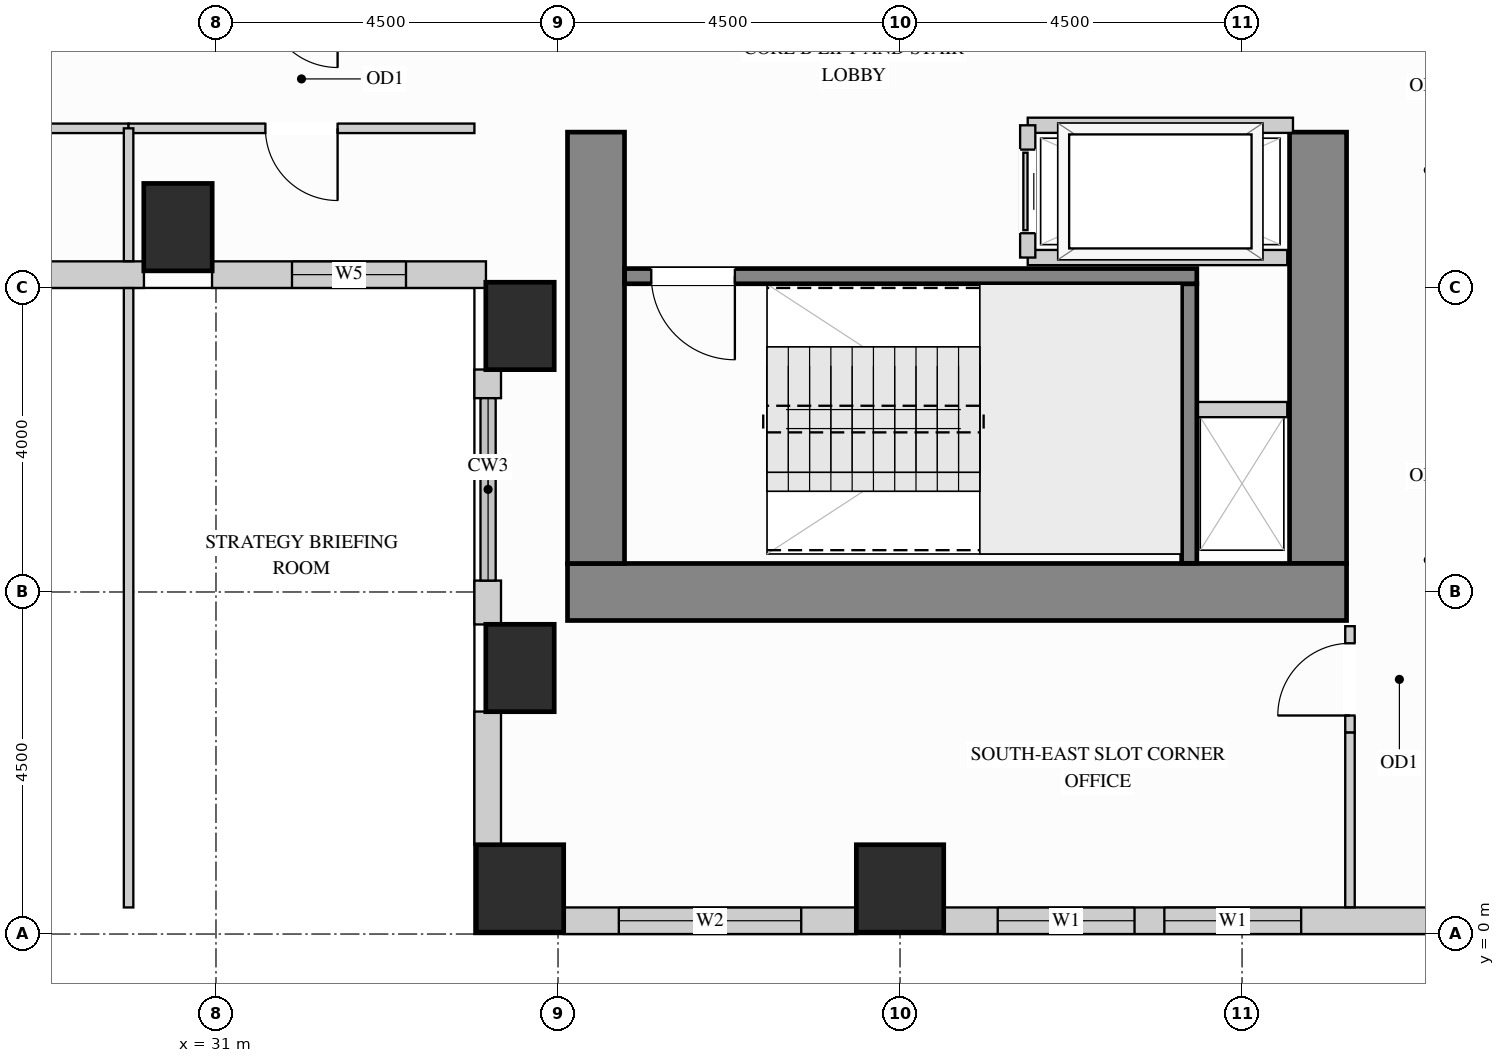
"""IFC4 building model, lengths in metres.
Left out: names, types, materials, properties, quantities, classifications, styles, units other than length and angle.
Written with IfcOpenShell. Run it as: python <this file> out.ifc"""

import sys

from ifc_helpers import new_model, si_unit, direction, frame, frame_2d, origin, origin_2d, place, context, subcontext, project, spatial, rectangle, extrude, source, transform, mapped, element, fill, save


model = new_model("IFC4")
c1 = context("Model", 3, precision=1e-05, world=origin(), true_north=direction((0.0, 1.0)))
c2 = subcontext(c1, "Body", "Model", "MODEL_VIEW")
j1 = project(units=[si_unit("LENGTHUNIT", "METRE"), si_unit("PLANEANGLEUNIT", "RADIAN")], contexts=[c1])
p1 = place(None, origin())
s1 = spatial("IfcSite", under=j1, at=p1, CompositionType="ELEMENT")
p2 = place(p1, origin())
s2 = spatial("IfcBuilding", under=s1, at=p2, CompositionType="ELEMENT")
p3 = place(p2, frame((0.0, 0.0, 88.2)))
s3 = spatial("IfcBuildingStorey", under=s2, at=p3, CompositionType="ELEMENT", Elevation=88.2)
m1 = source(origin(), c2, "Body", "SweptSolid", [
    extrude(rectangle(XDim=0.9, YDim=1.15, at=origin_2d()), origin(), (0.0, 0.0, 1.0), 3.38),
])
for number, where, z_axis, x_axis in (
    (1, (35.0, 3.5, 0.0), (0.0, 0.0, 1.0), (1.0, 0.0, 0.0)),
    (2, (35.0, 8.0, 0.0), (0.0, 0.0, 1.0), (1.0, 0.0, 0.0)),
    (3, (30.5, 9.3, 0.0), (0.0, 0.0, 1.0), (1.0, 0.0, 0.0)),
):
    element("IfcColumn", number, at=place(p3, frame(where, z_axis=z_axis, x_axis=x_axis)), inside=s3, PredefinedType="COLUMN", context=c2, shape_type="MappedRepresentation", body=[
        mapped(m1, transform((0.0, 0.0, 0.0), x_axis=(1.0, 0.0, 0.0), y_axis=(0.0, 1.0, 0.0), z_axis=(0.0, 0.0, 1.0))),
    ])
m2 = source(origin(), c2, "Body", "SweptSolid", [
    extrude(rectangle(XDim=1.15, YDim=1.15, at=origin_2d()), origin(), (0.0, 0.0, 1.0), 3.38),
])
for number, where, z_axis, x_axis in (
    (4, (35.0, 0.6, 0.0), (0.0, 0.0, 1.0), (1.0, 0.0, 0.0)),
    (5, (40.0, 0.6, 0.0), (0.0, 0.0, 1.0), (1.0, 0.0, 0.0)),
):
    element("IfcColumn", number, at=place(p3, frame(where, z_axis=z_axis, x_axis=x_axis)), inside=s3, PredefinedType="COLUMN", context=c2, shape_type="MappedRepresentation", body=[
        mapped(m2, transform((0.0, 0.0, 0.0), x_axis=(1.0, 0.0, 0.0), y_axis=(0.0, 1.0, 0.0), z_axis=(0.0, 0.0, 1.0))),
    ])
m3 = source(origin(), c2, "Body", "SweptSolid", [
    extrude(rectangle(XDim=5.675, YDim=0.75, at=frame_2d((2.837, 0.0))), origin(), (0.0, 0.0, 1.0), 3.38),
])
p4 = place(p3, frame((45.5, 4.875, 0.0), z_axis=(0.0, 0.0, 1.0), x_axis=(0.0, 1.0, 0.0)))
e6 = element("IfcWall", 6, at=p4, inside=s3, PredefinedType="SHEAR", context=c2, shape_type="MappedRepresentation", body=[
    mapped(m3, transform((0.0, 0.0, 0.0), x_axis=(1.0, 0.0, 0.0), y_axis=(0.0, 1.0, 0.0), z_axis=(0.0, 0.0, 1.0))),
])
m4 = source(origin(), c2, "Body", "SweptSolid", [
    extrude(rectangle(XDim=10.25, YDim=0.75, at=frame_2d((5.125, 0.0))), origin(), (0.0, 0.0, 1.0), 3.38),
])
p5 = place(p3, frame((35.625, 4.5, 0.0), z_axis=(0.0, 0.0, 1.0), x_axis=(1.0, 0.0, 0.0)))
e7 = element("IfcWall", 7, at=p5, inside=s3, PredefinedType="SHEAR", context=c2, shape_type="MappedRepresentation", body=[
    mapped(m4, transform((0.0, 0.0, 0.0), x_axis=(1.0, 0.0, 0.0), y_axis=(0.0, 1.0, 0.0), z_axis=(0.0, 0.0, 1.0))),
])
p6 = place(p3, frame((36.0, 4.875, 0.0), z_axis=(0.0, 0.0, 1.0), x_axis=(0.0, 1.0, 0.0)))
e8 = element("IfcWall", 8, at=p6, inside=s3, PredefinedType="SHEAR", context=c2, shape_type="MappedRepresentation", body=[
    mapped(m3, transform((0.0, 0.0, 0.0), x_axis=(1.0, 0.0, 0.0), y_axis=(0.0, 1.0, 0.0), z_axis=(0.0, 0.0, 1.0))),
])
p7 = place(p3, frame((23.848, 8.675, 0.0), z_axis=(0.0, 0.0, 1.0), x_axis=(1.0, 0.0, 0.0)))
e9 = element("IfcWall", 9, at=p7, inside=s3, PredefinedType="SOLIDWALL", context=c2, shape_type="SweptSolid", body=[
    extrude(rectangle(XDim=6.204, YDim=0.35, at=frame_2d((3.102, 0.0))), origin(), (0.0, 0.0, 1.0), 3.365),
])
p8 = place(p7, frame((1.131, 0.0, 0.78)))
e10 = element("IfcOpeningElement", 10, at=p8, cuts=e9, PredefinedType="OPENING", context=c2, shape_type="SweptSolid", body=[
    extrude(rectangle(XDim=1.5, YDim=2.0, at=frame_2d((0.75, 1.0))), frame((0.0, 0.185, 0.0), z_axis=(0.0, -1.0, 0.0), x_axis=(1.0, 0.0, 0.0)), (0.0, 0.0, 1.0), 0.37),
])
p9 = place(p7, frame((3.441, 0.0, 0.78)))
e11 = element("IfcOpeningElement", 11, at=p9, cuts=e9, PredefinedType="OPENING", context=c2, shape_type="SweptSolid", body=[
    extrude(rectangle(XDim=1.5, YDim=2.0, at=frame_2d((0.75, 1.0))), frame((0.0, 0.185, 0.0), z_axis=(0.0, -1.0, 0.0), x_axis=(1.0, 0.0, 0.0)), (0.0, 0.0, 1.0), 0.37),
])
p10 = place(p3, frame((30.948, 8.675, 0.0), z_axis=(0.0, 0.0, 1.0), x_axis=(1.0, 0.0, 0.0)))
e12 = element("IfcWall", 12, at=p10, inside=s3, PredefinedType="SOLIDWALL", context=c2, shape_type="SweptSolid", body=[
    extrude(rectangle(XDim=3.604, YDim=0.35, at=frame_2d((1.802, 0.0))), origin(), (0.0, 0.0, 1.0), 3.365),
])
p11 = place(p10, frame((1.052, 0.0, 0.78)))
e13 = element("IfcOpeningElement", 13, at=p11, cuts=e12, PredefinedType="OPENING", context=c2, shape_type="SweptSolid", body=[
    extrude(rectangle(XDim=1.5, YDim=2.0, at=frame_2d((0.75, 1.0))), frame((0.0, 0.185, 0.0), z_axis=(0.0, -1.0, 0.0), x_axis=(1.0, 0.0, 0.0)), (0.0, 0.0, 1.0), 0.37),
])
m5 = source(origin(), c2, "Body", "SweptSolid", [
    extrude(rectangle(XDim=0.377, YDim=0.35, at=frame_2d((0.188, 0.0))), origin(), (0.0, 0.0, 1.0), 3.365),
])
p12 = place(p3, frame((34.575, 7.427, 0.0), z_axis=(0.0, 0.0, 1.0), x_axis=(0.0, -1.0, 0.0)))
e14 = element("IfcWall", 14, at=p12, inside=s3, PredefinedType="SOLIDWALL", context=c2, shape_type="MappedRepresentation", body=[
    mapped(m5, transform((0.0, 0.0, 0.0), x_axis=(1.0, 0.0, 0.0), y_axis=(0.0, 1.0, 0.0), z_axis=(0.0, 0.0, 1.0))),
])
m6 = source(origin(), c2, "Body", "SweptSolid", [
    extrude(rectangle(XDim=0.577, YDim=0.35, at=frame_2d((0.289, 0.0))), origin(), (0.0, 0.0, 1.0), 3.365),
])
p13 = place(p3, frame((34.575, 4.65, 0.0), z_axis=(0.0, 0.0, 1.0), x_axis=(0.0, -1.0, 0.0)))
e15 = element("IfcWall", 15, at=p13, inside=s3, PredefinedType="SOLIDWALL", context=c2, shape_type="MappedRepresentation", body=[
    mapped(m6, transform((0.0, 0.0, 0.0), x_axis=(1.0, 0.0, 0.0), y_axis=(0.0, 1.0, 0.0), z_axis=(0.0, 0.0, 1.0))),
])
m7 = source(origin(), c2, "Body", "SweptSolid", [
    extrude(rectangle(XDim=1.754, YDim=0.35, at=frame_2d((0.877, 0.0))), origin(), (0.0, 0.0, 1.0), 3.365),
])
p14 = place(p3, frame((34.575, 2.927, 0.0), z_axis=(0.0, 0.0, 1.0), x_axis=(0.0, -1.0, 0.0)))
e16 = element("IfcWall", 16, at=p14, inside=s3, PredefinedType="SOLIDWALL", context=c2, shape_type="MappedRepresentation", body=[
    mapped(m7, transform((0.0, 0.0, 0.0), x_axis=(1.0, 0.0, 0.0), y_axis=(0.0, 1.0, 0.0), z_axis=(0.0, 0.0, 1.0))),
])
p15 = place(p3, frame((35.573, 0.175, 0.0), z_axis=(0.0, 0.0, 1.0), x_axis=(1.0, 0.0, 0.0)))
e17 = element("IfcWall", 17, at=p15, inside=s3, PredefinedType="SOLIDWALL", context=c2, shape_type="SweptSolid", body=[
    extrude(rectangle(XDim=3.854, YDim=0.35, at=frame_2d((1.927, 0.0))), origin(), (0.0, 0.0, 1.0), 2.428),
])
p16 = place(p15, frame((0.727, 0.0, 0.78)))
e18 = element("IfcOpeningElement", 18, at=p16, cuts=e17, PredefinedType="OPENING", context=c2, shape_type="SweptSolid", body=[
    extrude(rectangle(XDim=2.4, YDim=1.468, at=frame_2d((1.2, 0.734))), frame((0.0, 0.185, 0.0), z_axis=(0.0, -1.0, 0.0), x_axis=(1.0, 0.0, 0.0)), (0.0, 0.0, 1.0), 0.37),
])
p17 = place(p3, frame((40.573, 0.175, 0.0), z_axis=(0.0, 0.0, 1.0), x_axis=(1.0, 0.0, 0.0)))
e19 = element("IfcWall", 19, at=p17, inside=s3, PredefinedType="SOLIDWALL", context=c2, shape_type="SweptSolid", body=[
    extrude(rectangle(XDim=6.454, YDim=0.35, at=frame_2d((3.227, 0.0))), origin(), (0.0, 0.0, 1.0), 2.428),
])
p18 = place(p17, frame((0.712, 0.0, 0.78)))
e20 = element("IfcOpeningElement", 20, at=p18, cuts=e19, PredefinedType="OPENING", context=c2, shape_type="SweptSolid", body=[
    extrude(rectangle(XDim=1.8, YDim=1.468, at=frame_2d((0.9, 0.734))), frame((0.0, 0.185, 0.0), z_axis=(0.0, -1.0, 0.0), x_axis=(1.0, 0.0, 0.0)), (0.0, 0.0, 1.0), 0.37),
])
p19 = place(p17, frame((2.905, 0.0, 0.78)))
e21 = element("IfcOpeningElement", 21, at=p19, cuts=e19, PredefinedType="OPENING", context=c2, shape_type="SweptSolid", body=[
    extrude(rectangle(XDim=1.8, YDim=1.468, at=frame_2d((0.9, 0.734))), frame((0.0, 0.185, 0.0), z_axis=(0.0, -1.0, 0.0), x_axis=(1.0, 0.0, 0.0)), (0.0, 0.0, 1.0), 0.37),
])
p20 = place(p3, frame((45.92, 2.65, 0.0), z_axis=(0.0, 0.0, 1.0), x_axis=(0.0, 1.0, 0.0)))
e22 = element("IfcWall", 22, at=p20, inside=s3, PredefinedType="PARTITIONING", context=c2, shape_type="SweptSolid", body=[
    extrude(rectangle(XDim=1.4, YDim=0.125, at=frame_2d((0.7, 0.0))), origin(), (0.0, 0.0, 1.0), 3.365),
])
p21 = place(p20, frame((0.225, 0.0, 0.0)))
e23 = element("IfcOpeningElement", 23, at=p21, cuts=e22, PredefinedType="OPENING", context=c2, shape_type="SweptSolid", body=[
    extrude(rectangle(XDim=0.95, YDim=2.15, at=frame_2d((0.475, 1.075))), frame((0.0, 0.073, 0.0), z_axis=(0.0, -1.0, 0.0), x_axis=(1.0, 0.0, 0.0)), (0.0, 0.0, 1.0), 0.145),
])
m8 = source(origin(), c2, "Body", "SweptSolid", [
    extrude(rectangle(XDim=2.298, YDim=0.125, at=frame_2d((1.149, 0.0))), origin(), (0.0, 0.0, 1.0), 3.365),
])
p22 = place(p3, frame((45.92, 0.352, 0.0), z_axis=(0.0, 0.0, 1.0), x_axis=(0.0, 1.0, 0.0)))
e24 = element("IfcWall", 24, at=p22, inside=s3, PredefinedType="PARTITIONING", context=c2, shape_type="MappedRepresentation", body=[
    mapped(m8, transform((0.0, 0.0, 0.0), x_axis=(1.0, 0.0, 0.0), y_axis=(0.0, 1.0, 0.0), z_axis=(0.0, 0.0, 1.0))),
])
p23 = place(p3, frame((23.85, 10.6, 0.0), z_axis=(0.0, 0.0, 1.0), x_axis=(1.0, 0.0, 0.0)))
e25 = element("IfcWall", 25, at=p23, inside=s3, PredefinedType="PARTITIONING", context=c2, shape_type="SweptSolid", body=[
    extrude(rectangle(XDim=6.0, YDim=0.125, at=frame_2d((3.0, 0.0))), origin(), (0.0, 0.0, 1.0), 3.365),
])
p24 = place(p23, frame((2.525, 0.0, 0.0)))
e26 = element("IfcOpeningElement", 26, at=p24, cuts=e25, PredefinedType="OPENING", context=c2, shape_type="SweptSolid", body=[
    extrude(rectangle(XDim=0.95, YDim=2.15, at=frame_2d((0.475, 1.075))), frame((0.0, 0.073, 0.0), z_axis=(0.0, -1.0, 0.0), x_axis=(1.0, 0.0, 0.0)), (0.0, 0.0, 1.0), 0.145),
])
p25 = place(p3, frame((29.85, 10.6, 0.0), z_axis=(0.0, 0.0, 1.0), x_axis=(1.0, 0.0, 0.0)))
e27 = element("IfcWall", 27, at=p25, inside=s3, PredefinedType="PARTITIONING", context=c2, shape_type="SweptSolid", body=[
    extrude(rectangle(XDim=4.55, YDim=0.125, at=frame_2d((2.275, 0.0))), origin(), (0.0, 0.0, 1.0), 3.365),
])
p26 = place(p25, frame((1.8, 0.0, 0.0)))
e28 = element("IfcOpeningElement", 28, at=p26, cuts=e27, PredefinedType="OPENING", context=c2, shape_type="SweptSolid", body=[
    extrude(rectangle(XDim=0.95, YDim=2.15, at=frame_2d((0.475, 1.075))), frame((0.0, 0.073, 0.0), z_axis=(0.0, -1.0, 0.0), x_axis=(1.0, 0.0, 0.0)), (0.0, 0.0, 1.0), 0.145),
])
m9 = source(origin(), c2, "Body", "SweptSolid", [
    extrude(rectangle(XDim=8.148, YDim=0.125, at=frame_2d((4.074, 0.0))), origin(), (0.0, 0.0, 1.0), 3.365),
])
p27 = place(p3, frame((29.85, 0.35, 0.0), z_axis=(0.0, 0.0, 1.0), x_axis=(0.0, 1.0, 0.0)))
e29 = element("IfcWall", 29, at=p27, inside=s3, PredefinedType="PARTITIONING", context=c2, shape_type="MappedRepresentation", body=[
    mapped(m9, transform((0.0, 0.0, 0.0), x_axis=(1.0, 0.0, 0.0), y_axis=(0.0, 1.0, 0.0), z_axis=(0.0, 0.0, 1.0))),
])
m10 = source(origin(), c2, "Body", "SweptSolid", [
    extrude(rectangle(XDim=1.748, YDim=0.125, at=frame_2d((0.874, 0.0))), origin(), (0.0, 0.0, 1.0), 3.365),
])
p28 = place(p3, frame((29.85, 8.852, 0.0), z_axis=(0.0, 0.0, 1.0), x_axis=(0.0, 1.0, 0.0)))
e30 = element("IfcWall", 30, at=p28, inside=s3, PredefinedType="PARTITIONING", context=c2, shape_type="MappedRepresentation", body=[
    mapped(m10, transform((0.0, 0.0, 0.0), x_axis=(1.0, 0.0, 0.0), y_axis=(0.0, 1.0, 0.0), z_axis=(0.0, 0.0, 1.0))),
])
m11 = source(origin(), c2, "Body", "SweptSolid", [
    extrude(rectangle(XDim=1.245, YDim=0.2, at=frame_2d((0.623, 0.0))), origin(), (0.0, 0.0, 1.0), 3.365),
])
p29 = place(p3, frame((43.85, 6.9, 0.0), z_axis=(0.0, 0.0, 1.0), x_axis=(1.0, 0.0, 0.0)))
e31 = element("IfcWall", 31, at=p29, inside=s3, PredefinedType="PARTITIONING", context=c2, shape_type="MappedRepresentation", body=[
    mapped(m11, transform((0.0, 0.0, 0.0), x_axis=(1.0, 0.0, 0.0), y_axis=(0.0, 1.0, 0.0), z_axis=(0.0, 0.0, 1.0))),
])
m12 = source(origin(), c2, "Body", "SweptSolid", [
    extrude(rectangle(XDim=3.49, YDim=0.2, at=frame_2d((1.745, 0.0))), origin(), (0.0, 0.0, 1.0), 3.365),
])
p30 = place(p3, frame((41.68, 10.64, 0.0), z_axis=(0.0, 0.0, 1.0), x_axis=(1.0, 0.0, 0.0)))
e32 = element("IfcWall", 32, at=p30, inside=s3, PredefinedType="PARTITIONING", context=c2, shape_type="MappedRepresentation", body=[
    mapped(m12, transform((0.0, 0.0, 0.0), x_axis=(1.0, 0.0, 0.0), y_axis=(0.0, 1.0, 0.0), z_axis=(0.0, 0.0, 1.0))),
])
m13 = source(origin(), c2, "Body", "SweptSolid", [
    extrude(rectangle(XDim=3.415, YDim=0.2, at=frame_2d((1.708, 0.0))), origin(), (0.0, 0.0, 1.0), 3.365),
])
p31 = place(p3, frame((41.68, 8.9, 0.0), z_axis=(0.0, 0.0, 1.0), x_axis=(1.0, 0.0, 0.0)))
e33 = element("IfcWall", 33, at=p31, inside=s3, PredefinedType="PARTITIONING", context=c2, shape_type="MappedRepresentation", body=[
    mapped(m13, transform((0.0, 0.0, 0.0), x_axis=(1.0, 0.0, 0.0), y_axis=(0.0, 1.0, 0.0), z_axis=(0.0, 0.0, 1.0))),
])
p32 = place(p3, frame((41.68, 8.9, 0.0), z_axis=(0.0, 0.0, 1.0), x_axis=(0.0, 1.0, 0.0)))
e34 = element("IfcWall", 34, at=p32, inside=s3, PredefinedType="PARTITIONING", context=c2, shape_type="SweptSolid", body=[
    extrude(rectangle(XDim=1.74, YDim=0.2, at=frame_2d((0.87, 0.0))), origin(), (0.0, 0.0, 1.0), 3.365),
])
p33 = place(p32, frame((0.32, 0.0, 0.0)))
e35 = element("IfcOpeningElement", 35, at=p33, cuts=e34, PredefinedType="OPENING", context=c2, shape_type="SweptSolid", body=[
    extrude(rectangle(XDim=1.1, YDim=2.2, at=frame_2d((0.55, 1.1))), frame((0.0, 0.11, 0.0), z_axis=(0.0, -1.0, 0.0), x_axis=(1.0, 0.0, 0.0)), (0.0, 0.0, 1.0), 0.22),
])
m14 = source(origin(), c2, "Body", "SweptSolid", [
    extrude(rectangle(XDim=3.678, YDim=0.2, at=frame_2d((1.839, 0.0))), origin(), (0.0, 0.0, 1.0), 3.38),
])
p34 = place(p3, frame((43.805, 4.877, 0.0), z_axis=(0.0, 0.0, 1.0), x_axis=(0.0, 1.0, 0.0)))
e36 = element("IfcWall", 36, at=p34, inside=s3, PredefinedType="SHEAR", context=c2, shape_type="MappedRepresentation", body=[
    mapped(m14, transform((0.0, 0.0, 0.0), x_axis=(1.0, 0.0, 0.0), y_axis=(0.0, 1.0, 0.0), z_axis=(0.0, 0.0, 1.0))),
])
p35 = place(p3, frame((36.377, 8.655, 0.0), z_axis=(0.0, 0.0, 1.0), x_axis=(1.0, 0.0, 0.0)))
e37 = element("IfcWall", 37, at=p35, inside=s3, PredefinedType="SHEAR", context=c2, shape_type="SweptSolid", body=[
    extrude(rectangle(XDim=7.528, YDim=0.2, at=frame_2d((3.764, 0.0))), origin(), (0.0, 0.0, 1.0), 3.38),
])
p36 = place(p35, frame((0.35, 0.0, 0.0)))
e38 = element("IfcOpeningElement", 38, at=p36, cuts=e37, PredefinedType="OPENING", context=c2, shape_type="SweptSolid", body=[
    extrude(rectangle(XDim=1.1, YDim=2.15, at=frame_2d((0.55, 1.075))), frame((0.0, 0.11, 0.0), z_axis=(0.0, -1.0, 0.0), x_axis=(1.0, 0.0, 0.0)), (0.0, 0.0, 1.0), 0.22),
])
m15 = source(origin(), c2, "Body", "SweptSolid", [
    extrude(rectangle(XDim=1.1, YDim=2.2, at=frame_2d((0.55, 1.1))), frame((0.0, 0.025, 0.0), z_axis=(0.0, -1.0, 0.0), x_axis=(1.0, 0.0, 0.0)), (0.0, 0.0, 1.0), 0.05),
])
p37 = place(p33, origin())
e39 = element("IfcDoor", 39, at=p37, inside=s3, OperationType="SLIDING_TO_LEFT", PredefinedType="DOOR", context=c2, shape_type="MappedRepresentation", body=[
    mapped(m15, transform((0.0, 0.0, 0.0), x_axis=(1.0, 0.0, 0.0), y_axis=(0.0, 1.0, 0.0), z_axis=(0.0, 0.0, 1.0))),
])
fill(e35, e39)
m16 = source(origin(), c2, "Body", "SweptSolid", [
    extrude(rectangle(XDim=0.95, YDim=2.15, at=frame_2d((0.475, 1.075))), frame((0.0, 0.025, 0.0), z_axis=(0.0, -1.0, 0.0), x_axis=(1.0, 0.0, 0.0)), (0.0, 0.0, 1.0), 0.05),
])
p38 = place(p21, origin())
e40 = element("IfcDoor", 40, at=p38, inside=s3, OperationType="SINGLE_SWING_LEFT", PredefinedType="DOOR", context=c2, shape_type="MappedRepresentation", body=[
    mapped(m16, transform((0.0, 0.0, 0.0), x_axis=(1.0, 0.0, 0.0), y_axis=(0.0, 1.0, 0.0), z_axis=(0.0, 0.0, 1.0))),
])
fill(e23, e40)
p39 = place(p26, origin())
e41 = element("IfcDoor", 41, at=p39, inside=s3, OperationType="SINGLE_SWING_RIGHT", PredefinedType="DOOR", context=c2, shape_type="MappedRepresentation", body=[
    mapped(m16, transform((0.0, 0.0, 0.0), x_axis=(1.0, 0.0, 0.0), y_axis=(0.0, 1.0, 0.0), z_axis=(0.0, 0.0, 1.0))),
])
fill(e28, e41)
m17 = source(origin(), c2, "Body", "SweptSolid", [
    extrude(rectangle(XDim=1.1, YDim=2.15, at=frame_2d((0.55, 1.075))), frame((0.0, 0.025, 0.0), z_axis=(0.0, -1.0, 0.0), x_axis=(1.0, 0.0, 0.0)), (0.0, 0.0, 1.0), 0.05),
])
p40 = place(p36, origin())
e42 = element("IfcDoor", 42, at=p40, inside=s3, OperationType="SINGLE_SWING_RIGHT", PredefinedType="DOOR", context=c2, shape_type="MappedRepresentation", body=[
    mapped(m17, transform((0.0, 0.0, 0.0), x_axis=(1.0, 0.0, 0.0), y_axis=(0.0, 1.0, 0.0), z_axis=(0.0, 0.0, 1.0))),
])
fill(e38, e42)
m18 = source(origin(), c2, "Body", "SweptSolid", [
    extrude(rectangle(XDim=1.8, YDim=1.468, at=frame_2d((0.9, 0.734))), frame((0.0, 0.03, 0.0), z_axis=(0.0, -1.0, 0.0), x_axis=(1.0, 0.0, 0.0)), (0.0, 0.0, 1.0), 0.06),
])
p41 = place(p18, origin())
e43 = element("IfcWindow", 43, at=p41, inside=s3, PartitioningType="SINGLE_PANEL", PredefinedType="WINDOW", context=c2, shape_type="MappedRepresentation", body=[
    mapped(m18, transform((0.0, 0.0, 0.0), x_axis=(1.0, 0.0, 0.0), y_axis=(0.0, 1.0, 0.0), z_axis=(0.0, 0.0, 1.0))),
])
fill(e20, e43)
p42 = place(p19, origin())
e44 = element("IfcWindow", 44, at=p42, inside=s3, PartitioningType="SINGLE_PANEL", PredefinedType="WINDOW", context=c2, shape_type="MappedRepresentation", body=[
    mapped(m18, transform((0.0, 0.0, 0.0), x_axis=(1.0, 0.0, 0.0), y_axis=(0.0, 1.0, 0.0), z_axis=(0.0, 0.0, 1.0))),
])
fill(e21, e44)
m19 = source(origin(), c2, "Body", "SweptSolid", [
    extrude(rectangle(XDim=2.4, YDim=1.468, at=frame_2d((1.2, 0.734))), frame((0.0, 0.03, 0.0), z_axis=(0.0, -1.0, 0.0), x_axis=(1.0, 0.0, 0.0)), (0.0, 0.0, 1.0), 0.06),
])
p43 = place(p16, origin())
e45 = element("IfcWindow", 45, at=p43, inside=s3, PartitioningType="SINGLE_PANEL", PredefinedType="WINDOW", context=c2, shape_type="MappedRepresentation", body=[
    mapped(m19, transform((0.0, 0.0, 0.0), x_axis=(1.0, 0.0, 0.0), y_axis=(0.0, 1.0, 0.0), z_axis=(0.0, 0.0, 1.0))),
])
fill(e18, e45)
m20 = source(origin(), c2, "Body", "SweptSolid", [
    extrude(rectangle(XDim=1.5, YDim=2.0, at=frame_2d((0.75, 1.0))), frame((0.0, 0.03, 0.0), z_axis=(0.0, -1.0, 0.0), x_axis=(1.0, 0.0, 0.0)), (0.0, 0.0, 1.0), 0.06),
])
p44 = place(p11, origin())
e46 = element("IfcWindow", 46, at=p44, inside=s3, PartitioningType="SINGLE_PANEL", PredefinedType="WINDOW", context=c2, shape_type="MappedRepresentation", body=[
    mapped(m20, transform((0.0, 0.0, 0.0), x_axis=(1.0, 0.0, 0.0), y_axis=(0.0, 1.0, 0.0), z_axis=(0.0, 0.0, 1.0))),
])
fill(e13, e46)
save(model, sys.argv[1])
